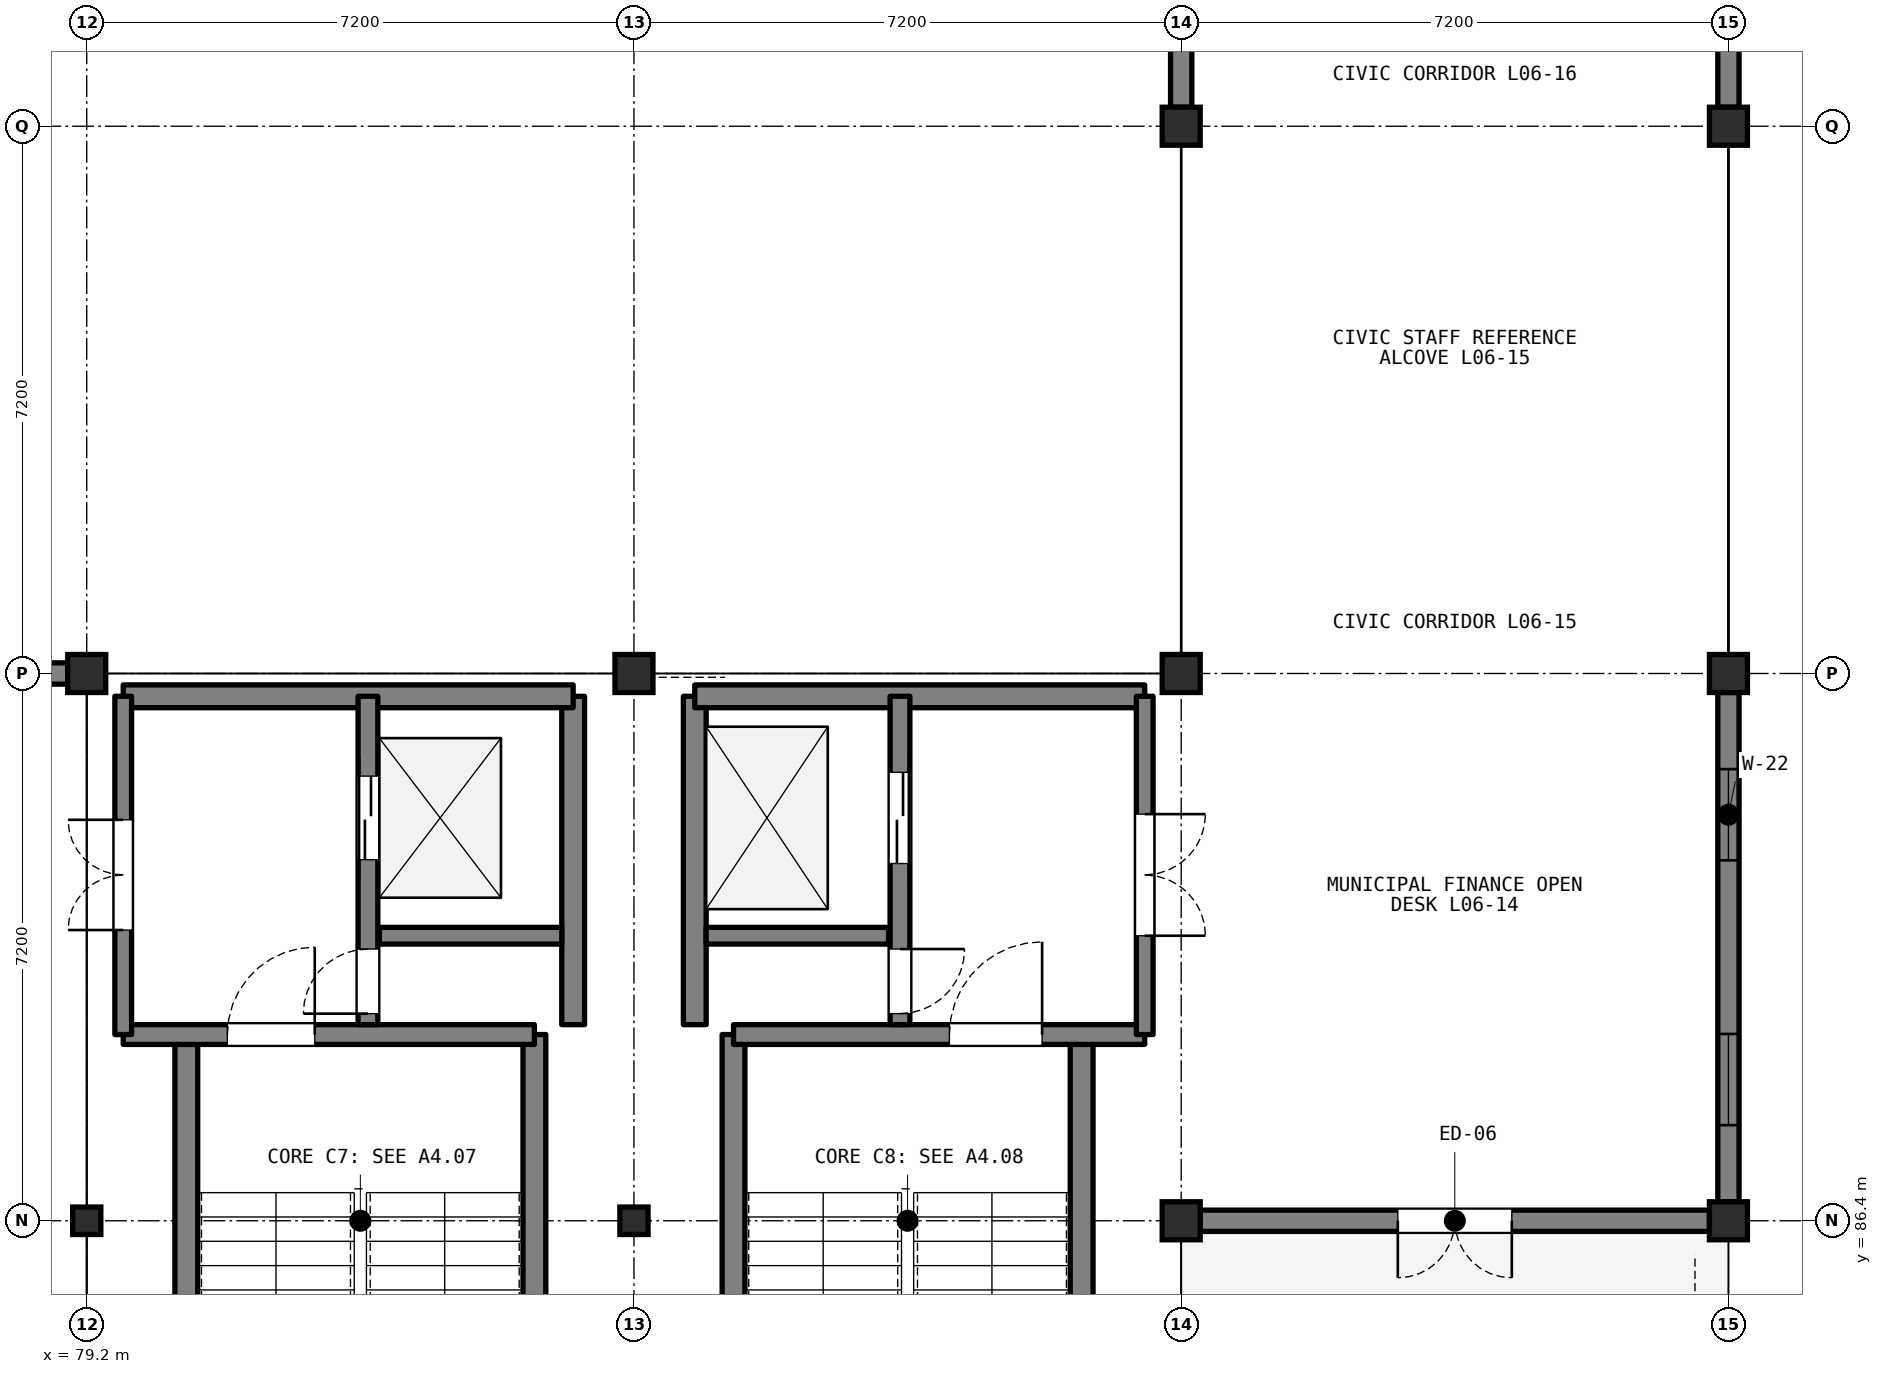
"""IFC4 building model, lengths in metres.
Left out: names, types, materials, properties, quantities, classifications, styles, units other than length and angle.
Written with IfcOpenShell. Run it as: python <this file> out.ifc"""

import sys

from ifc_helpers import new_model, si_unit, direction, frame, frame_2d, origin, origin_2d, place, context, subcontext, project, spatial, rectangle, i_section, extrude, element, fill, save


model = new_model("IFC4")
c1 = context("Model", 3, precision=1e-05, world=origin(), true_north=direction((0.0, 1.0)))
c2 = subcontext(c1, "Body", "Model", "MODEL_VIEW")
j1 = project(units=[si_unit("LENGTHUNIT", "METRE"), si_unit("PLANEANGLEUNIT", "RADIAN")], contexts=[c1])
p1 = place(None, origin())
s1 = spatial("IfcSite", under=j1, at=p1, CompositionType="ELEMENT")
p2 = place(p1, origin())
s2 = spatial("IfcBuilding", under=s1, at=p2, CompositionType="ELEMENT")
p3 = place(p2, frame((0.0, 0.0, 21.9)))
s3 = spatial("IfcBuildingStorey", under=s2, at=p3, CompositionType="ELEMENT", Elevation=21.9)
p4 = place(p3, frame((79.2, 86.4, 0.0), z_axis=(0.0, 0.0, 1.0), x_axis=(1.0, 0.0, 0.0)))
e1 = element("IfcColumn", 1, at=p4, inside=s3, PredefinedType="COLUMN", context=c2, shape_type="SweptSolid", body=[
    extrude(i_section(OverallWidth=0.371, OverallDepth=0.361, WebThickness=0.012, FlangeThickness=0.02, FilletRadius=0.015, at=origin_2d()), origin(), (0.0, 0.0, 1.0), 3.9),
])
p5 = place(p3, frame((79.2, 93.6, 0.0), z_axis=(0.0, 0.0, 1.0), x_axis=(1.0, 0.0, 0.0)))
e2 = element("IfcColumn", 2, at=p5, inside=s3, PredefinedType="COLUMN", context=c2, shape_type="SweptSolid", body=[
    extrude(rectangle(XDim=0.5, YDim=0.5, at=origin_2d()), origin(), (0.0, 0.0, 1.0), 3.9),
])
p6 = place(p3, frame((86.4, 86.4, 0.0), z_axis=(0.0, 0.0, 1.0), x_axis=(1.0, 0.0, 0.0)))
e3 = element("IfcColumn", 3, at=p6, inside=s3, PredefinedType="COLUMN", context=c2, shape_type="SweptSolid", body=[
    extrude(i_section(OverallWidth=0.371, OverallDepth=0.361, WebThickness=0.012, FlangeThickness=0.02, FilletRadius=0.015, at=origin_2d()), origin(), (0.0, 0.0, 1.0), 3.9),
])
for number, where, z_axis, x_axis in (
    (4, (86.4, 93.6, 0.0), (0.0, 0.0, 1.0), (1.0, 0.0, 0.0)),
    (5, (93.6, 86.4, 0.0), (0.0, 0.0, 1.0), (1.0, 0.0, 0.0)),
    (6, (93.6, 93.6, 0.0), (0.0, 0.0, 1.0), (1.0, 0.0, 0.0)),
    (7, (93.6, 100.8, 0.0), (0.0, 0.0, 1.0), (1.0, 0.0, 0.0)),
    (8, (100.8, 86.4, 0.0), (0.0, 0.0, 1.0), (1.0, 0.0, 0.0)),
    (9, (100.8, 93.6, 0.0), (0.0, 0.0, 1.0), (1.0, 0.0, 0.0)),
    (10, (100.8, 100.8, 0.0), (0.0, 0.0, 1.0), (1.0, 0.0, 0.0)),
):
    element("IfcColumn", number, at=place(p3, frame(where, z_axis=z_axis, x_axis=x_axis)), inside=s3, PredefinedType="COLUMN", context=c2, shape_type="SweptSolid", body=[
        extrude(rectangle(XDim=0.5, YDim=0.5, at=origin_2d()), origin(), (0.0, 0.0, 1.0), 3.9),
    ])
p7 = place(p3, frame((72.25, 93.6, 0.0), z_axis=(0.0, 0.0, 1.0), x_axis=(1.0, 0.0, 0.0)))
e11 = element("IfcWall", 11, at=p7, inside=s3, PredefinedType="SOLIDWALL", context=c2, shape_type="SweptSolid", body=[
    extrude(rectangle(XDim=6.7, YDim=0.28, at=frame_2d((3.35, 0.0))), origin(), (0.0, 0.0, 1.0), 3.192),
])
p8 = place(p3, frame((100.55, 86.4, 0.0), z_axis=(0.0, 0.0, 1.0), x_axis=(-1.0, 0.0, 0.0)))
e12 = element("IfcWall", 12, at=p8, inside=s3, PredefinedType="SOLIDWALL", context=c2, shape_type="SweptSolid", body=[
    extrude(rectangle(XDim=6.7, YDim=0.28, at=frame_2d((3.35, 0.0))), origin(), (0.0, 0.0, 1.0), 3.192),
])
p9 = place(p8, frame((2.6, 0.0, 0.0)))
e13 = element("IfcOpeningElement", 13, at=p9, cuts=e12, PredefinedType="OPENING", context=c2, shape_type="SweptSolid", body=[
    extrude(rectangle(XDim=1.5, YDim=2.25, at=frame_2d((0.75, 1.125))), frame((0.0, 0.15, 0.0), z_axis=(0.0, -1.0, 0.0), x_axis=(1.0, 0.0, 0.0)), (0.0, 0.0, 1.0), 0.3),
])
p10 = place(p3, frame((100.8, 93.35, 0.0), z_axis=(0.0, 0.0, 1.0), x_axis=(0.0, -1.0, 0.0)))
e14 = element("IfcWall", 14, at=p10, inside=s3, PredefinedType="SOLIDWALL", context=c2, shape_type="SweptSolid", body=[
    extrude(rectangle(XDim=6.7, YDim=0.28, at=frame_2d((3.35, 0.0))), origin(), (0.0, 0.0, 1.0), 3.192),
])
p11 = place(p10, frame((1.008, 0.0, 0.95)))
e15 = element("IfcOpeningElement", 15, at=p11, cuts=e14, PredefinedType="OPENING", context=c2, shape_type="SweptSolid", body=[
    extrude(rectangle(XDim=1.2, YDim=1.7, at=frame_2d((0.6, 0.85))), frame((0.0, 0.15, 0.0), z_axis=(0.0, -1.0, 0.0), x_axis=(1.0, 0.0, 0.0)), (0.0, 0.0, 1.0), 0.3),
])
p12 = place(p10, frame((4.492, 0.0, 0.95)))
e16 = element("IfcOpeningElement", 16, at=p12, cuts=e14, PredefinedType="OPENING", context=c2, shape_type="SweptSolid", body=[
    extrude(rectangle(XDim=1.2, YDim=1.7, at=frame_2d((0.6, 0.85))), frame((0.0, 0.15, 0.0), z_axis=(0.0, -1.0, 0.0), x_axis=(1.0, 0.0, 0.0)), (0.0, 0.0, 1.0), 0.3),
])
p13 = place(p3, frame((93.6, 101.05, 0.0), z_axis=(0.0, 0.0, 1.0), x_axis=(0.0, 1.0, 0.0)))
e17 = element("IfcWall", 17, at=p13, inside=s3, PredefinedType="SOLIDWALL", context=c2, shape_type="SweptSolid", body=[
    extrude(rectangle(XDim=6.7, YDim=0.28, at=frame_2d((3.35, 0.0))), origin(), (0.0, 0.0, 1.0), 3.192),
])
p14 = place(p13, frame((1.008, 0.0, 0.95)))
e18 = element("IfcOpeningElement", 18, at=p14, cuts=e17, PredefinedType="OPENING", context=c2, shape_type="SweptSolid", body=[
    extrude(rectangle(XDim=1.2, YDim=1.7, at=frame_2d((0.6, 0.85))), frame((0.0, 0.15, 0.0), z_axis=(0.0, -1.0, 0.0), x_axis=(1.0, 0.0, 0.0)), (0.0, 0.0, 1.0), 0.3),
])
p15 = place(p13, frame((4.492, 0.0, 0.95)))
e19 = element("IfcOpeningElement", 19, at=p15, cuts=e17, PredefinedType="OPENING", context=c2, shape_type="SweptSolid", body=[
    extrude(rectangle(XDim=1.2, YDim=1.7, at=frame_2d((0.6, 0.85))), frame((0.0, 0.15, 0.0), z_axis=(0.0, -1.0, 0.0), x_axis=(1.0, 0.0, 0.0)), (0.0, 0.0, 1.0), 0.3),
])
p16 = place(p3, frame((100.8, 107.75, 0.0), z_axis=(0.0, 0.0, 1.0), x_axis=(0.0, -1.0, 0.0)))
e20 = element("IfcWall", 20, at=p16, inside=s3, PredefinedType="SOLIDWALL", context=c2, shape_type="SweptSolid", body=[
    extrude(rectangle(XDim=6.7, YDim=0.28, at=frame_2d((3.35, 0.0))), origin(), (0.0, 0.0, 1.0), 3.192),
])
p17 = place(p16, frame((1.008, 0.0, 0.95)))
e21 = element("IfcOpeningElement", 21, at=p17, cuts=e20, PredefinedType="OPENING", context=c2, shape_type="SweptSolid", body=[
    extrude(rectangle(XDim=1.2, YDim=1.7, at=frame_2d((0.6, 0.85))), frame((0.0, 0.15, 0.0), z_axis=(0.0, -1.0, 0.0), x_axis=(1.0, 0.0, 0.0)), (0.0, 0.0, 1.0), 0.3),
])
p18 = place(p16, frame((4.492, 0.0, 0.95)))
e22 = element("IfcOpeningElement", 22, at=p18, cuts=e20, PredefinedType="OPENING", context=c2, shape_type="SweptSolid", body=[
    extrude(rectangle(XDim=1.2, YDim=1.7, at=frame_2d((0.6, 0.85))), frame((0.0, 0.15, 0.0), z_axis=(0.0, -1.0, 0.0), x_axis=(1.0, 0.0, 0.0)), (0.0, 0.0, 1.0), 0.3),
])
for number, where, z_axis, x_axis in (
    (23, (80.51, 79.55, 0.0), (0.0, 0.0, 1.0), (0.0, 1.0, 0.0)),
    (24, (85.09, 79.55, 0.0), (0.0, 0.0, 1.0), (0.0, 1.0, 0.0)),
):
    element("IfcWall", number, at=place(p3, frame(where, z_axis=z_axis, x_axis=x_axis)), inside=s3, PredefinedType="SHEAR", context=c2, shape_type="SweptSolid", body=[
        extrude(rectangle(XDim=9.3, YDim=0.3, at=frame_2d((4.65, 0.0))), origin(), (0.0, 0.0, 1.0), 3.72),
    ])
p19 = place(p3, frame((79.68, 88.85, 0.0), z_axis=(0.0, 0.0, 1.0), x_axis=(1.0, 0.0, 0.0)))
e25 = element("IfcWall", 25, at=p19, inside=s3, PredefinedType="SHEAR", context=c2, shape_type="SweptSolid", body=[
    extrude(rectangle(XDim=5.41, YDim=0.26, at=frame_2d((2.705, 0.0))), origin(), (0.0, 0.0, 1.0), 3.72),
])
p20 = place(p19, frame((1.37, 0.0, 0.0)))
e26 = element("IfcOpeningElement", 26, at=p20, cuts=e25, PredefinedType="OPENING", context=c2, shape_type="SweptSolid", body=[
    extrude(rectangle(XDim=1.15, YDim=2.15, at=frame_2d((0.575, 1.075))), frame((0.0, 0.14, 0.0), z_axis=(0.0, -1.0, 0.0), x_axis=(1.0, 0.0, 0.0)), (0.0, 0.0, 1.0), 0.28),
])
p21 = place(p3, frame((85.6, 88.98, 0.0), z_axis=(0.0, 0.0, 1.0), x_axis=(0.0, 1.0, 0.0)))
e27 = element("IfcWall", 27, at=p21, inside=s3, PredefinedType="SHEAR", context=c2, shape_type="SweptSolid", body=[
    extrude(rectangle(XDim=4.32, YDim=0.3, at=frame_2d((2.16, 0.0))), origin(), (0.0, 0.0, 1.0), 3.72),
])
p22 = place(p3, frame((79.68, 93.3, 0.0), z_axis=(0.0, 0.0, 1.0), x_axis=(1.0, 0.0, 0.0)))
e28 = element("IfcWall", 28, at=p22, inside=s3, PredefinedType="SHEAR", context=c2, shape_type="SweptSolid", body=[
    extrude(rectangle(XDim=5.92, YDim=0.3, at=frame_2d((2.96, 0.0))), origin(), (0.0, 0.0, 1.0), 3.72),
])
p23 = place(p3, frame((83.05, 90.15, 0.0), z_axis=(0.0, 0.0, 1.0), x_axis=(1.0, 0.0, 0.0)))
e29 = element("IfcWall", 29, at=p23, inside=s3, PredefinedType="SHEAR", context=c2, shape_type="SweptSolid", body=[
    extrude(rectangle(XDim=2.4, YDim=0.22, at=frame_2d((1.2, 0.0))), origin(), (0.0, 0.0, 1.0), 3.72),
])
p24 = place(p3, frame((82.9, 88.98, 0.0), z_axis=(0.0, 0.0, 1.0), x_axis=(0.0, 1.0, 0.0)))
e30 = element("IfcWall", 30, at=p24, inside=s3, PredefinedType="SHEAR", context=c2, shape_type="SweptSolid", body=[
    extrude(rectangle(XDim=4.32, YDim=0.26, at=frame_2d((2.16, 0.0))), origin(), (0.0, 0.0, 1.0), 3.72),
])
p25 = place(p24, frame((2.17, 0.0, 0.0)))
e31 = element("IfcOpeningElement", 31, at=p25, cuts=e30, PredefinedType="OPENING", context=c2, shape_type="SweptSolid", body=[
    extrude(rectangle(XDim=1.1, YDim=2.15, at=frame_2d((0.55, 1.075))), frame((0.0, 0.14, 0.0), z_axis=(0.0, -1.0, 0.0), x_axis=(1.0, 0.0, 0.0)), (0.0, 0.0, 1.0), 0.28),
])
p26 = place(p24, frame((0.145, 0.0, 0.0)))
e32 = element("IfcOpeningElement", 32, at=p26, cuts=e30, PredefinedType="OPENING", context=c2, shape_type="SweptSolid", body=[
    extrude(rectangle(XDim=0.85, YDim=2.05, at=frame_2d((0.425, 1.025))), frame((0.0, 0.14, 0.0), z_axis=(0.0, -1.0, 0.0), x_axis=(1.0, 0.0, 0.0)), (0.0, 0.0, 1.0), 0.28),
])
p27 = place(p3, frame((79.68, 88.85, 0.0), z_axis=(0.0, 0.0, 1.0), x_axis=(0.0, 1.0, 0.0)))
e33 = element("IfcWall", 33, at=p27, inside=s3, PredefinedType="SHEAR", context=c2, shape_type="SweptSolid", body=[
    extrude(rectangle(XDim=4.45, YDim=0.22, at=frame_2d((2.225, 0.0))), origin(), (0.0, 0.0, 1.0), 3.72),
])
p28 = place(p27, frame((1.375, 0.0, 0.0)))
e34 = element("IfcOpeningElement", 34, at=p28, cuts=e33, PredefinedType="OPENING", context=c2, shape_type="SweptSolid", body=[
    extrude(rectangle(XDim=1.45, YDim=2.2, at=frame_2d((0.725, 1.1))), frame((0.0, 0.12, 0.0), z_axis=(0.0, -1.0, 0.0), x_axis=(1.0, 0.0, 0.0)), (0.0, 0.0, 1.0), 0.24),
])
for number, where, z_axis, x_axis in (
    (35, (87.71, 79.55, 0.0), (0.0, 0.0, 1.0), (0.0, 1.0, 0.0)),
    (36, (92.29, 79.55, 0.0), (0.0, 0.0, 1.0), (0.0, 1.0, 0.0)),
):
    element("IfcWall", number, at=place(p3, frame(where, z_axis=z_axis, x_axis=x_axis)), inside=s3, PredefinedType="SHEAR", context=c2, shape_type="SweptSolid", body=[
        extrude(rectangle(XDim=9.3, YDim=0.3, at=frame_2d((4.65, 0.0))), origin(), (0.0, 0.0, 1.0), 3.72),
    ])
p29 = place(p3, frame((87.71, 88.85, 0.0), z_axis=(0.0, 0.0, 1.0), x_axis=(1.0, 0.0, 0.0)))
e37 = element("IfcWall", 37, at=p29, inside=s3, PredefinedType="SHEAR", context=c2, shape_type="SweptSolid", body=[
    extrude(rectangle(XDim=5.41, YDim=0.26, at=frame_2d((2.705, 0.0))), origin(), (0.0, 0.0, 1.0), 3.72),
])
p30 = place(p29, frame((2.84, 0.0, 0.0)))
e38 = element("IfcOpeningElement", 38, at=p30, cuts=e37, PredefinedType="OPENING", context=c2, shape_type="SweptSolid", body=[
    extrude(rectangle(XDim=1.22, YDim=2.15, at=frame_2d((0.61, 1.075))), frame((0.0, 0.14, 0.0), z_axis=(0.0, -1.0, 0.0), x_axis=(1.0, 0.0, 0.0)), (0.0, 0.0, 1.0), 0.28),
])
p31 = place(p3, frame((87.2, 88.98, 0.0), z_axis=(0.0, 0.0, 1.0), x_axis=(0.0, 1.0, 0.0)))
e39 = element("IfcWall", 39, at=p31, inside=s3, PredefinedType="SHEAR", context=c2, shape_type="SweptSolid", body=[
    extrude(rectangle(XDim=4.32, YDim=0.3, at=frame_2d((2.16, 0.0))), origin(), (0.0, 0.0, 1.0), 3.72),
])
p32 = place(p3, frame((87.2, 93.3, 0.0), z_axis=(0.0, 0.0, 1.0), x_axis=(1.0, 0.0, 0.0)))
e40 = element("IfcWall", 40, at=p32, inside=s3, PredefinedType="SHEAR", context=c2, shape_type="SweptSolid", body=[
    extrude(rectangle(XDim=5.92, YDim=0.3, at=frame_2d((2.96, 0.0))), origin(), (0.0, 0.0, 1.0), 3.72),
])
p33 = place(p3, frame((87.35, 90.15, 0.0), z_axis=(0.0, 0.0, 1.0), x_axis=(1.0, 0.0, 0.0)))
e41 = element("IfcWall", 41, at=p33, inside=s3, PredefinedType="SHEAR", context=c2, shape_type="SweptSolid", body=[
    extrude(rectangle(XDim=2.4, YDim=0.22, at=frame_2d((1.2, 0.0))), origin(), (0.0, 0.0, 1.0), 3.72),
])
p34 = place(p3, frame((89.9, 93.3, 0.0), z_axis=(0.0, 0.0, 1.0), x_axis=(0.0, -1.0, 0.0)))
e42 = element("IfcWall", 42, at=p34, inside=s3, PredefinedType="SHEAR", context=c2, shape_type="SweptSolid", body=[
    extrude(rectangle(XDim=4.32, YDim=0.26, at=frame_2d((2.16, 0.0))), origin(), (0.0, 0.0, 1.0), 3.72),
])
p35 = place(p34, frame((1.0, 0.0, 0.0)))
e43 = element("IfcOpeningElement", 43, at=p35, cuts=e42, PredefinedType="OPENING", context=c2, shape_type="SweptSolid", body=[
    extrude(rectangle(XDim=1.2, YDim=2.15, at=frame_2d((0.6, 1.075))), frame((0.0, 0.14, 0.0), z_axis=(0.0, -1.0, 0.0), x_axis=(1.0, 0.0, 0.0)), (0.0, 0.0, 1.0), 0.28),
])
p36 = place(p34, frame((3.325, 0.0, 0.0)))
e44 = element("IfcOpeningElement", 44, at=p36, cuts=e42, PredefinedType="OPENING", context=c2, shape_type="SweptSolid", body=[
    extrude(rectangle(XDim=0.85, YDim=2.05, at=frame_2d((0.425, 1.025))), frame((0.0, 0.14, 0.0), z_axis=(0.0, -1.0, 0.0), x_axis=(1.0, 0.0, 0.0)), (0.0, 0.0, 1.0), 0.28),
])
p37 = place(p3, frame((93.12, 93.3, 0.0), z_axis=(0.0, 0.0, 1.0), x_axis=(0.0, -1.0, 0.0)))
e45 = element("IfcWall", 45, at=p37, inside=s3, PredefinedType="SHEAR", context=c2, shape_type="SweptSolid", body=[
    extrude(rectangle(XDim=4.45, YDim=0.22, at=frame_2d((2.225, 0.0))), origin(), (0.0, 0.0, 1.0), 3.72),
])
p38 = place(p37, frame((1.55, 0.0, 0.0)))
e46 = element("IfcOpeningElement", 46, at=p38, cuts=e45, PredefinedType="OPENING", context=c2, shape_type="SweptSolid", body=[
    extrude(rectangle(XDim=1.6, YDim=2.2, at=frame_2d((0.8, 1.1))), frame((0.0, 0.12, 0.0), z_axis=(0.0, -1.0, 0.0), x_axis=(1.0, 0.0, 0.0)), (0.0, 0.0, 1.0), 0.24),
])
p39 = place(p9, origin())
e47 = element("IfcDoor", 47, at=p39, inside=s3, OperationType="DOUBLE_DOOR_SINGLE_SWING", PredefinedType="DOOR", context=c2, shape_type="SweptSolid", body=[
    extrude(rectangle(XDim=1.5, YDim=2.25, at=frame_2d((0.75, 1.125))), frame((0.0, 0.025, 0.0), z_axis=(0.0, -1.0, 0.0), x_axis=(1.0, 0.0, 0.0)), (0.0, 0.0, 1.0), 0.05),
])
fill(e13, e47)
p40 = place(p11, origin())
e48 = element("IfcWindow", 48, at=p40, inside=s3, PartitioningType="SINGLE_PANEL", PredefinedType="WINDOW", context=c2, shape_type="SweptSolid", body=[
    extrude(rectangle(XDim=1.2, YDim=1.7, at=frame_2d((0.6, 0.85))), frame((0.0, 0.03, 0.0), z_axis=(0.0, -1.0, 0.0), x_axis=(1.0, 0.0, 0.0)), (0.0, 0.0, 1.0), 0.06),
])
fill(e15, e48)
p41 = place(p12, origin())
e49 = element("IfcWindow", 49, at=p41, inside=s3, PartitioningType="SINGLE_PANEL", PredefinedType="WINDOW", context=c2, shape_type="SweptSolid", body=[
    extrude(rectangle(XDim=1.2, YDim=1.7, at=frame_2d((0.6, 0.85))), frame((0.0, 0.03, 0.0), z_axis=(0.0, -1.0, 0.0), x_axis=(1.0, 0.0, 0.0)), (0.0, 0.0, 1.0), 0.06),
])
fill(e16, e49)
p42 = place(p20, origin())
e50 = element("IfcDoor", 50, at=p42, inside=s3, OperationType="SINGLE_SWING_RIGHT", PredefinedType="DOOR", context=c2, shape_type="SweptSolid", body=[
    extrude(rectangle(XDim=1.15, YDim=2.15, at=frame_2d((0.575, 1.075))), frame((0.0, 0.025, 0.0), z_axis=(0.0, -1.0, 0.0), x_axis=(1.0, 0.0, 0.0)), (0.0, 0.0, 1.0), 0.05),
])
fill(e26, e50)
p43 = place(p25, origin())
e51 = element("IfcDoor", 51, at=p43, inside=s3, OperationType="DOUBLE_DOOR_SLIDING", PredefinedType="DOOR", context=c2, shape_type="SweptSolid", body=[
    extrude(rectangle(XDim=1.1, YDim=2.15, at=frame_2d((0.55, 1.075))), frame((0.0, 0.025, 0.0), z_axis=(0.0, -1.0, 0.0), x_axis=(1.0, 0.0, 0.0)), (0.0, 0.0, 1.0), 0.05),
])
fill(e31, e51)
p44 = place(p26, origin())
e52 = element("IfcDoor", 52, at=p44, inside=s3, OperationType="SINGLE_SWING_LEFT", PredefinedType="DOOR", context=c2, shape_type="SweptSolid", body=[
    extrude(rectangle(XDim=0.85, YDim=2.05, at=frame_2d((0.425, 1.025))), frame((0.0, 0.025, 0.0), z_axis=(0.0, -1.0, 0.0), x_axis=(1.0, 0.0, 0.0)), (0.0, 0.0, 1.0), 0.05),
])
fill(e32, e52)
p45 = place(p28, origin())
e53 = element("IfcDoor", 53, at=p45, inside=s3, OperationType="DOUBLE_DOOR_SINGLE_SWING", PredefinedType="DOOR", context=c2, shape_type="SweptSolid", body=[
    extrude(rectangle(XDim=1.45, YDim=2.2, at=frame_2d((0.725, 1.1))), frame((0.0, 0.025, 0.0), z_axis=(0.0, -1.0, 0.0), x_axis=(1.0, 0.0, 0.0)), (0.0, 0.0, 1.0), 0.05),
])
fill(e34, e53)
p46 = place(p30, origin())
e54 = element("IfcDoor", 54, at=p46, inside=s3, OperationType="SINGLE_SWING_RIGHT", PredefinedType="DOOR", context=c2, shape_type="SweptSolid", body=[
    extrude(rectangle(XDim=1.22, YDim=2.15, at=frame_2d((0.61, 1.075))), frame((0.0, 0.025, 0.0), z_axis=(0.0, -1.0, 0.0), x_axis=(1.0, 0.0, 0.0)), (0.0, 0.0, 1.0), 0.05),
])
fill(e38, e54)
p47 = place(p35, origin())
e55 = element("IfcDoor", 55, at=p47, inside=s3, OperationType="DOUBLE_DOOR_SLIDING", PredefinedType="DOOR", context=c2, shape_type="SweptSolid", body=[
    extrude(rectangle(XDim=1.2, YDim=2.15, at=frame_2d((0.6, 1.075))), frame((0.0, 0.025, 0.0), z_axis=(0.0, -1.0, 0.0), x_axis=(1.0, 0.0, 0.0)), (0.0, 0.0, 1.0), 0.05),
])
fill(e43, e55)
p48 = place(p36, origin())
e56 = element("IfcDoor", 56, at=p48, inside=s3, OperationType="SINGLE_SWING_LEFT", PredefinedType="DOOR", context=c2, shape_type="SweptSolid", body=[
    extrude(rectangle(XDim=0.85, YDim=2.05, at=frame_2d((0.425, 1.025))), frame((0.0, 0.025, 0.0), z_axis=(0.0, -1.0, 0.0), x_axis=(1.0, 0.0, 0.0)), (0.0, 0.0, 1.0), 0.05),
])
fill(e44, e56)
p49 = place(p38, origin())
e57 = element("IfcDoor", 57, at=p49, inside=s3, OperationType="DOUBLE_DOOR_SINGLE_SWING", PredefinedType="DOOR", context=c2, shape_type="SweptSolid", body=[
    extrude(rectangle(XDim=1.6, YDim=2.2, at=frame_2d((0.8, 1.1))), frame((0.0, 0.025, 0.0), z_axis=(0.0, -1.0, 0.0), x_axis=(1.0, 0.0, 0.0)), (0.0, 0.0, 1.0), 0.05),
])
fill(e46, e57)
save(model, sys.argv[1])
